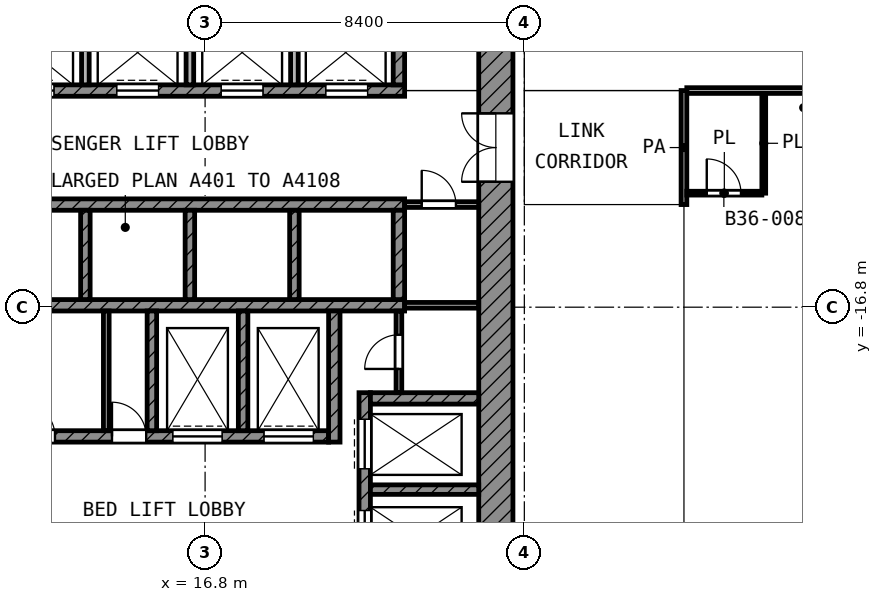
"""IFC4 building model, lengths in metres.
Left out: names, types, materials, properties, quantities, classifications, styles, units other than length and angle.
Written with IfcOpenShell. Run it as: python <this file> out.ifc"""

import sys

from ifc_helpers import new_model, si_unit, direction, frame, frame_2d, origin, place, context, subcontext, project, spatial, rectangle, extrude, element, fill, save


model = new_model("IFC4")
c1 = context("Model", 3, precision=1e-05, world=origin(), true_north=direction((0.0, 1.0)))
c2 = subcontext(c1, "Body", "Model", "MODEL_VIEW")
j1 = project(units=[si_unit("LENGTHUNIT", "METRE"), si_unit("PLANEANGLEUNIT", "RADIAN")], contexts=[c1])
p1 = place(None, origin())
s1 = spatial("IfcSite", under=j1, at=p1, CompositionType="ELEMENT")
p2 = place(p1, origin())
s2 = spatial("IfcBuilding", under=s1, at=p2, CompositionType="ELEMENT")
p3 = place(p2, frame((0.0, 0.0, 158.4)))
s3 = spatial("IfcBuildingStorey", under=s2, at=p3, CompositionType="ELEMENT", Elevation=158.4)
p4 = place(p3, frame((24.45, -24.0, 0.0), z_axis=(0.0, 0.0, 1.0), x_axis=(0.0, 1.0, 0.0)))
e1 = element("IfcWall", 1, at=p4, inside=s3, PredefinedType="SHEAR", context=c2, shape_type="SweptSolid", body=[
    extrude(rectangle(XDim=18.6, YDim=0.9, at=frame_2d((9.3, 0.0))), origin(), (0.0, 0.0, 1.0), 3.6),
])
p5 = place(p4, frame((10.5, 0.0, 0.0)))
e2 = element("IfcOpeningElement", 2, at=p5, cuts=e1, PredefinedType="OPENING", context=c2, shape_type="SweptSolid", body=[
    extrude(rectangle(XDim=1.8, YDim=2.1, at=frame_2d((0.9, 1.05))), frame((0.0, 0.46, 0.0), z_axis=(0.0, -1.0, 0.0), x_axis=(1.0, 0.0, 0.0)), (0.0, 0.0, 1.0), 0.92),
])
p6 = place(p3, frame((5.4, -11.1, 0.0), z_axis=(0.0, 0.0, 1.0), x_axis=(1.0, 0.0, 0.0)))
e3 = element("IfcWall", 3, at=p6, inside=s3, PredefinedType="SHEAR", context=c2, shape_type="SweptSolid", body=[
    extrude(rectangle(XDim=16.65, YDim=0.3, at=frame_2d((8.325, 0.0))), origin(), (0.0, 0.0, 1.0), 3.6),
])
p7 = place(p6, frame((0.825, 0.0, 0.0)))
e4 = element("IfcOpeningElement", 4, at=p7, cuts=e3, PredefinedType="OPENING", context=c2, shape_type="SweptSolid", body=[
    extrude(rectangle(XDim=1.1, YDim=2.1, at=frame_2d((0.55, 1.05))), frame((0.0, 0.16, 0.0), z_axis=(0.0, -1.0, 0.0), x_axis=(1.0, 0.0, 0.0)), (0.0, 0.0, 1.0), 0.32),
])
p8 = place(p6, frame((3.575, 0.0, 0.0)))
e5 = element("IfcOpeningElement", 5, at=p8, cuts=e3, PredefinedType="OPENING", context=c2, shape_type="SweptSolid", body=[
    extrude(rectangle(XDim=1.1, YDim=2.1, at=frame_2d((0.55, 1.05))), frame((0.0, 0.16, 0.0), z_axis=(0.0, -1.0, 0.0), x_axis=(1.0, 0.0, 0.0)), (0.0, 0.0, 1.0), 0.32),
])
p9 = place(p6, frame((6.325, 0.0, 0.0)))
e6 = element("IfcOpeningElement", 6, at=p9, cuts=e3, PredefinedType="OPENING", context=c2, shape_type="SweptSolid", body=[
    extrude(rectangle(XDim=1.1, YDim=2.1, at=frame_2d((0.55, 1.05))), frame((0.0, 0.16, 0.0), z_axis=(0.0, -1.0, 0.0), x_axis=(1.0, 0.0, 0.0)), (0.0, 0.0, 1.0), 0.32),
])
p10 = place(p6, frame((9.075, 0.0, 0.0)))
e7 = element("IfcOpeningElement", 7, at=p10, cuts=e3, PredefinedType="OPENING", context=c2, shape_type="SweptSolid", body=[
    extrude(rectangle(XDim=1.1, YDim=2.1, at=frame_2d((0.55, 1.05))), frame((0.0, 0.16, 0.0), z_axis=(0.0, -1.0, 0.0), x_axis=(1.0, 0.0, 0.0)), (0.0, 0.0, 1.0), 0.32),
])
p11 = place(p6, frame((11.825, 0.0, 0.0)))
e8 = element("IfcOpeningElement", 8, at=p11, cuts=e3, PredefinedType="OPENING", context=c2, shape_type="SweptSolid", body=[
    extrude(rectangle(XDim=1.1, YDim=2.1, at=frame_2d((0.55, 1.05))), frame((0.0, 0.16, 0.0), z_axis=(0.0, -1.0, 0.0), x_axis=(1.0, 0.0, 0.0)), (0.0, 0.0, 1.0), 0.32),
])
p12 = place(p6, frame((14.575, 0.0, 0.0)))
e9 = element("IfcOpeningElement", 9, at=p12, cuts=e3, PredefinedType="OPENING", context=c2, shape_type="SweptSolid", body=[
    extrude(rectangle(XDim=1.1, YDim=2.1, at=frame_2d((0.55, 1.05))), frame((0.0, 0.16, 0.0), z_axis=(0.0, -1.0, 0.0), x_axis=(1.0, 0.0, 0.0)), (0.0, 0.0, 1.0), 0.32),
])
p13 = place(p3, frame((5.4, -14.1, 0.0), z_axis=(0.0, 0.0, 1.0), x_axis=(1.0, 0.0, 0.0)))
e10 = element("IfcWall", 10, at=p13, inside=s3, PredefinedType="SHEAR", context=c2, shape_type="SweptSolid", body=[
    extrude(rectangle(XDim=16.65, YDim=0.3, at=frame_2d((8.325, 0.0))), origin(), (0.0, 0.0, 1.0), 3.6),
])
p14 = place(p13, frame((0.825, 0.0, 0.0)))
e11 = element("IfcOpeningElement", 11, at=p14, cuts=e10, PredefinedType="OPENING", context=c2, shape_type="SweptSolid", body=[
    extrude(rectangle(XDim=1.1, YDim=2.1, at=frame_2d((0.55, 1.05))), frame((0.0, 0.16, 0.0), z_axis=(0.0, -1.0, 0.0), x_axis=(1.0, 0.0, 0.0)), (0.0, 0.0, 1.0), 0.32),
])
p15 = place(p13, frame((3.575, 0.0, 0.0)))
e12 = element("IfcOpeningElement", 12, at=p15, cuts=e10, PredefinedType="OPENING", context=c2, shape_type="SweptSolid", body=[
    extrude(rectangle(XDim=1.1, YDim=2.1, at=frame_2d((0.55, 1.05))), frame((0.0, 0.16, 0.0), z_axis=(0.0, -1.0, 0.0), x_axis=(1.0, 0.0, 0.0)), (0.0, 0.0, 1.0), 0.32),
])
p16 = place(p3, frame((5.4, -16.75, 0.0), z_axis=(0.0, 0.0, 1.0), x_axis=(1.0, 0.0, 0.0)))
e13 = element("IfcWall", 13, at=p16, inside=s3, PredefinedType="SHEAR", context=c2, shape_type="SweptSolid", body=[
    extrude(rectangle(XDim=16.65, YDim=0.3, at=frame_2d((8.325, 0.0))), origin(), (0.0, 0.0, 1.0), 3.6),
])
p17 = place(p3, frame((5.4, -20.2, 0.0), z_axis=(0.0, 0.0, 1.0), x_axis=(1.0, 0.0, 0.0)))
e14 = element("IfcWall", 14, at=p17, inside=s3, PredefinedType="SHEAR", context=c2, shape_type="SweptSolid", body=[
    extrude(rectangle(XDim=14.65, YDim=0.3, at=frame_2d((7.325, 0.0))), origin(), (0.0, 0.0, 1.0), 3.6),
])
p18 = place(p17, frame((10.55, 0.0, 0.0)))
e15 = element("IfcOpeningElement", 15, at=p18, cuts=e14, PredefinedType="OPENING", context=c2, shape_type="SweptSolid", body=[
    extrude(rectangle(XDim=1.3, YDim=2.1, at=frame_2d((0.65, 1.05))), frame((0.0, 0.16, 0.0), z_axis=(0.0, -1.0, 0.0), x_axis=(1.0, 0.0, 0.0)), (0.0, 0.0, 1.0), 0.32),
])
p19 = place(p17, frame((12.95, 0.0, 0.0)))
e16 = element("IfcOpeningElement", 16, at=p19, cuts=e14, PredefinedType="OPENING", context=c2, shape_type="SweptSolid", body=[
    extrude(rectangle(XDim=1.3, YDim=2.1, at=frame_2d((0.65, 1.05))), frame((0.0, 0.16, 0.0), z_axis=(0.0, -1.0, 0.0), x_axis=(1.0, 0.0, 0.0)), (0.0, 0.0, 1.0), 0.32),
])
p20 = place(p17, frame((0.55, 0.0, 0.0)))
e17 = element("IfcOpeningElement", 17, at=p20, cuts=e14, PredefinedType="OPENING", context=c2, shape_type="SweptSolid", body=[
    extrude(rectangle(XDim=1.3, YDim=2.1, at=frame_2d((0.65, 1.05))), frame((0.0, 0.16, 0.0), z_axis=(0.0, -1.0, 0.0), x_axis=(1.0, 0.0, 0.0)), (0.0, 0.0, 1.0), 0.32),
])
p21 = place(p17, frame((2.95, 0.0, 0.0)))
e18 = element("IfcOpeningElement", 18, at=p21, cuts=e14, PredefinedType="OPENING", context=c2, shape_type="SweptSolid", body=[
    extrude(rectangle(XDim=1.3, YDim=2.1, at=frame_2d((0.65, 1.05))), frame((0.0, 0.16, 0.0), z_axis=(0.0, -1.0, 0.0), x_axis=(1.0, 0.0, 0.0)), (0.0, 0.0, 1.0), 0.32),
])
p22 = place(p17, frame((6.55, 0.0, 0.0)))
e19 = element("IfcOpeningElement", 19, at=p22, cuts=e14, PredefinedType="OPENING", context=c2, shape_type="SweptSolid", body=[
    extrude(rectangle(XDim=0.9, YDim=2.1, at=frame_2d((0.45, 1.05))), frame((0.0, 0.16, 0.0), z_axis=(0.0, -1.0, 0.0), x_axis=(1.0, 0.0, 0.0)), (0.0, 0.0, 1.0), 0.32),
])
p23 = place(p17, frame((8.95, 0.0, 0.0)))
e20 = element("IfcOpeningElement", 20, at=p23, cuts=e14, PredefinedType="OPENING", context=c2, shape_type="SweptSolid", body=[
    extrude(rectangle(XDim=0.9, YDim=2.1, at=frame_2d((0.45, 1.05))), frame((0.0, 0.16, 0.0), z_axis=(0.0, -1.0, 0.0), x_axis=(1.0, 0.0, 0.0)), (0.0, 0.0, 1.0), 0.32),
])
p24 = place(p3, frame((20.2, -20.35, 0.0), z_axis=(0.0, 0.0, 1.0), x_axis=(0.0, 1.0, 0.0)))
e21 = element("IfcWall", 21, at=p24, inside=s3, PredefinedType="SHEAR", context=c2, shape_type="SweptSolid", body=[
    extrude(rectangle(XDim=3.45, YDim=0.3, at=frame_2d((1.725, 0.0))), origin(), (0.0, 0.0, 1.0), 3.6),
])
p25 = place(p3, frame((21.9, -10.95, 0.0), z_axis=(0.0, 0.0, 1.0), x_axis=(0.0, 1.0, 0.0)))
e22 = element("IfcWall", 22, at=p25, inside=s3, PredefinedType="SHEAR", context=c2, shape_type="SweptSolid", body=[
    extrude(rectangle(XDim=2.35, YDim=0.3, at=frame_2d((1.175, 0.0))), origin(), (0.0, 0.0, 1.0), 3.6),
])
p26 = place(p3, frame((21.9, -16.6, 0.0), z_axis=(0.0, 0.0, 1.0), x_axis=(0.0, 1.0, 0.0)))
e23 = element("IfcWall", 23, at=p26, inside=s3, PredefinedType="SHEAR", context=c2, shape_type="SweptSolid", body=[
    extrude(rectangle(XDim=2.35, YDim=0.3, at=frame_2d((1.175, 0.0))), origin(), (0.0, 0.0, 1.0), 3.6),
])
p27 = place(p3, frame((21.15, -19.2, 0.0), z_axis=(0.0, 0.0, 1.0), x_axis=(1.0, 0.0, 0.0)))
e24 = element("IfcWall", 24, at=p27, inside=s3, PredefinedType="SHEAR", context=c2, shape_type="SweptSolid", body=[
    extrude(rectangle(XDim=2.85, YDim=0.3, at=frame_2d((1.425, 0.0))), origin(), (0.0, 0.0, 1.0), 3.6),
])
p28 = place(p3, frame((21.0, -24.0, 0.0), z_axis=(0.0, 0.0, 1.0), x_axis=(0.0, 1.0, 0.0)))
e25 = element("IfcWall", 25, at=p28, inside=s3, PredefinedType="SHEAR", context=c2, shape_type="SweptSolid", body=[
    extrude(rectangle(XDim=4.95, YDim=0.3, at=frame_2d((2.475, 0.0))), origin(), (0.0, 0.0, 1.0), 3.6),
])
p29 = place(p28, frame((2.95, 0.0, 0.0)))
e26 = element("IfcOpeningElement", 26, at=p29, cuts=e25, PredefinedType="OPENING", context=c2, shape_type="SweptSolid", body=[
    extrude(rectangle(XDim=1.3, YDim=2.1, at=frame_2d((0.65, 1.05))), frame((0.0, 0.16, 0.0), z_axis=(0.0, -1.0, 0.0), x_axis=(1.0, 0.0, 0.0)), (0.0, 0.0, 1.0), 0.32),
])
p30 = place(p28, frame((0.55, 0.0, 0.0)))
e27 = element("IfcOpeningElement", 27, at=p30, cuts=e25, PredefinedType="OPENING", context=c2, shape_type="SweptSolid", body=[
    extrude(rectangle(XDim=1.3, YDim=2.1, at=frame_2d((0.65, 1.05))), frame((0.0, 0.16, 0.0), z_axis=(0.0, -1.0, 0.0), x_axis=(1.0, 0.0, 0.0)), (0.0, 0.0, 1.0), 0.32),
])
p31 = place(p3, frame((21.15, -21.6, 0.0), z_axis=(0.0, 0.0, 1.0), x_axis=(1.0, 0.0, 0.0)))
e28 = element("IfcWall", 28, at=p31, inside=s3, PredefinedType="SHEAR", context=c2, shape_type="SweptSolid", body=[
    extrude(rectangle(XDim=2.85, YDim=0.25, at=frame_2d((1.425, 0.0))), origin(), (0.0, 0.0, 1.0), 3.6),
])
for number, where, z_axis, x_axis in (
    (29, (15.4, -20.05, 0.0), (0.0, 0.0, 1.0), (0.0, 1.0, 0.0)),
    (30, (17.8, -20.05, 0.0), (0.0, 0.0, 1.0), (0.0, 1.0, 0.0)),
):
    element("IfcWall", number, at=place(p3, frame(where, z_axis=z_axis, x_axis=x_axis)), inside=s3, PredefinedType="SHEAR", context=c2, shape_type="SweptSolid", body=[
        extrude(rectangle(XDim=3.15, YDim=0.25, at=frame_2d((1.575, 0.0))), origin(), (0.0, 0.0, 1.0), 3.6),
    ])
for number, where, z_axis, x_axis in (
    (31, (13.65, -10.95, 0.0), (0.0, 0.0, 1.0), (0.0, 1.0, 0.0)),
    (32, (16.4, -10.95, 0.0), (0.0, 0.0, 1.0), (0.0, 1.0, 0.0)),
    (33, (19.15, -10.95, 0.0), (0.0, 0.0, 1.0), (0.0, 1.0, 0.0)),
):
    element("IfcWall", number, at=place(p3, frame(where, z_axis=z_axis, x_axis=x_axis)), inside=s3, PredefinedType="PARTITIONING", context=c2, shape_type="SweptSolid", body=[
        extrude(rectangle(XDim=2.35, YDim=0.2, at=frame_2d((1.175, 0.0))), origin(), (0.0, 0.0, 1.0), 3.6),
    ])
for number, where, z_axis, x_axis in (
    (34, (13.65, -16.6, 0.0), (0.0, 0.0, 1.0), (0.0, 1.0, 0.0)),
    (35, (16.4, -16.6, 0.0), (0.0, 0.0, 1.0), (0.0, 1.0, 0.0)),
    (36, (19.15, -16.6, 0.0), (0.0, 0.0, 1.0), (0.0, 1.0, 0.0)),
):
    element("IfcWall", number, at=place(p3, frame(where, z_axis=z_axis, x_axis=x_axis)), inside=s3, PredefinedType="SHEAR", context=c2, shape_type="SweptSolid", body=[
        extrude(rectangle(XDim=2.35, YDim=0.25, at=frame_2d((1.175, 0.0))), origin(), (0.0, 0.0, 1.0), 3.6),
    ])
p32 = place(p3, frame((21.9, -19.05, 0.0), z_axis=(0.0, 0.0, 1.0), x_axis=(0.0, 1.0, 0.0)))
e37 = element("IfcWall", 37, at=p32, inside=s3, PredefinedType="PARTITIONING", context=c2, shape_type="SweptSolid", body=[
    extrude(rectangle(XDim=2.15, YDim=0.15, at=frame_2d((1.075, 0.0))), origin(), (0.0, 0.0, 1.0), 3.6),
])
p33 = place(p32, frame((0.625, 0.0, 0.0)))
e38 = element("IfcOpeningElement", 38, at=p33, cuts=e37, PredefinedType="OPENING", context=c2, shape_type="SweptSolid", body=[
    extrude(rectangle(XDim=0.9, YDim=2.1, at=frame_2d((0.45, 1.05))), frame((0.0, 0.085, 0.0), z_axis=(0.0, -1.0, 0.0), x_axis=(1.0, 0.0, 0.0)), (0.0, 0.0, 1.0), 0.17),
])
p34 = place(p3, frame((22.05, -16.75, 0.0), z_axis=(0.0, 0.0, 1.0), x_axis=(1.0, 0.0, 0.0)))
e39 = element("IfcWall", 39, at=p34, inside=s3, PredefinedType="PARTITIONING", context=c2, shape_type="SweptSolid", body=[
    extrude(rectangle(XDim=1.95, YDim=0.15, at=frame_2d((0.975, 0.0))), origin(), (0.0, 0.0, 1.0), 3.6),
])
p35 = place(p3, frame((22.05, -14.1, 0.0), z_axis=(0.0, 0.0, 1.0), x_axis=(1.0, 0.0, 0.0)))
e40 = element("IfcWall", 40, at=p35, inside=s3, PredefinedType="PARTITIONING", context=c2, shape_type="SweptSolid", body=[
    extrude(rectangle(XDim=1.95, YDim=0.15, at=frame_2d((0.975, 0.0))), origin(), (0.0, 0.0, 1.0), 3.6),
])
p36 = place(p35, frame((0.45, 0.0, 0.0)))
e41 = element("IfcOpeningElement", 41, at=p36, cuts=e40, PredefinedType="OPENING", context=c2, shape_type="SweptSolid", body=[
    extrude(rectangle(XDim=0.9, YDim=2.1, at=frame_2d((0.45, 1.05))), frame((0.0, 0.085, 0.0), z_axis=(0.0, -1.0, 0.0), x_axis=(1.0, 0.0, 0.0)), (0.0, 0.0, 1.0), 0.17),
])
p37 = place(p3, frame((14.2, -20.05, 0.0), z_axis=(0.0, 0.0, 1.0), x_axis=(0.0, 1.0, 0.0)))
e42 = element("IfcWall", 42, at=p37, inside=s3, PredefinedType="PARTITIONING", context=c2, shape_type="SweptSolid", body=[
    extrude(rectangle(XDim=3.15, YDim=0.15, at=frame_2d((1.575, 0.0))), origin(), (0.0, 0.0, 1.0), 3.6),
])
p38 = place(p3, frame((29.475, -13.8, 0.0), z_axis=(0.0, 0.0, 1.0), x_axis=(1.0, 0.0, 0.0)))
e43 = element("IfcWall", 43, at=p38, inside=s3, PredefinedType="PARTITIONING", context=c2, shape_type="SweptSolid", body=[
    extrude(rectangle(XDim=1.975, YDim=0.1, at=frame_2d((0.987, 0.0))), origin(), (0.0, 0.0, 1.0), 3.6),
])
p39 = place(p38, frame((0.525, 0.0, 0.0)))
e44 = element("IfcOpeningElement", 44, at=p39, cuts=e43, PredefinedType="OPENING", context=c2, shape_type="SweptSolid", body=[
    extrude(rectangle(XDim=0.9, YDim=2.1, at=frame_2d((0.45, 1.05))), frame((0.0, 0.06, 0.0), z_axis=(0.0, -1.0, 0.0), x_axis=(1.0, 0.0, 0.0)), (0.0, 0.0, 1.0), 0.12),
])
p40 = place(p3, frame((31.5, -13.8, 0.0), z_axis=(0.0, 0.0, 1.0), x_axis=(0.0, 1.0, 0.0)))
e45 = element("IfcWall", 45, at=p40, inside=s3, PredefinedType="PARTITIONING", context=c2, shape_type="SweptSolid", body=[
    extrude(rectangle(XDim=2.625, YDim=0.1, at=frame_2d((1.312, 0.0))), origin(), (0.0, 0.0, 1.0), 3.6),
])
p41 = place(p3, frame((29.475, -11.1, 0.0), z_axis=(0.0, 0.0, 1.0), x_axis=(1.0, 0.0, 0.0)))
e46 = element("IfcWall", 46, at=p41, inside=s3, PredefinedType="PARTITIONING", context=c2, shape_type="SweptSolid", body=[
    extrude(rectangle(XDim=37.645, YDim=0.15, at=frame_2d((18.823, 0.0))), origin(), (0.0, 0.0, 1.0), 3.6),
])
p42 = place(p41, frame((17.225, 0.0, 0.0)))
e47 = element("IfcOpeningElement", 47, at=p42, cuts=e46, PredefinedType="OPENING", context=c2, shape_type="SweptSolid", body=[
    extrude(rectangle(XDim=1.2, YDim=2.1, at=frame_2d((0.6, 1.05))), frame((0.0, 0.085, 0.0), z_axis=(0.0, -1.0, 0.0), x_axis=(1.0, 0.0, 0.0)), (0.0, 0.0, 1.0), 0.17),
])
p43 = place(p41, frame((9.325, 0.0, 0.0)))
e48 = element("IfcOpeningElement", 48, at=p43, cuts=e46, PredefinedType="OPENING", context=c2, shape_type="SweptSolid", body=[
    extrude(rectangle(XDim=1.2, YDim=2.1, at=frame_2d((0.6, 1.05))), frame((0.0, 0.085, 0.0), z_axis=(0.0, -1.0, 0.0), x_axis=(1.0, 0.0, 0.0)), (0.0, 0.0, 1.0), 0.17),
])
p44 = place(p41, frame((27.025, 0.0, 0.0)))
e49 = element("IfcOpeningElement", 49, at=p44, cuts=e46, PredefinedType="OPENING", context=c2, shape_type="SweptSolid", body=[
    extrude(rectangle(XDim=1.0, YDim=2.1, at=frame_2d((0.5, 1.05))), frame((0.0, 0.085, 0.0), z_axis=(0.0, -1.0, 0.0), x_axis=(1.0, 0.0, 0.0)), (0.0, 0.0, 1.0), 0.17),
])
p45 = place(p41, frame((32.775, 0.0, 0.0)))
e50 = element("IfcOpeningElement", 50, at=p45, cuts=e46, PredefinedType="OPENING", context=c2, shape_type="SweptSolid", body=[
    extrude(rectangle(XDim=1.5, YDim=2.1, at=frame_2d((0.75, 1.05))), frame((0.0, 0.085, 0.0), z_axis=(0.0, -1.0, 0.0), x_axis=(1.0, 0.0, 0.0)), (0.0, 0.0, 1.0), 0.17),
])
p46 = place(p3, frame((29.4, -14.1, 0.0), z_axis=(0.0, 0.0, 1.0), x_axis=(0.0, 1.0, 0.0)))
e51 = element("IfcWall", 51, at=p46, inside=s3, PredefinedType="PARTITIONING", context=c2, shape_type="SweptSolid", body=[
    extrude(rectangle(XDim=3.0, YDim=0.15, at=frame_2d((1.5, 0.0))), origin(), (0.0, 0.0, 1.0), 3.6),
])
p47 = place(p9, origin())
e52 = element("IfcDoor", 52, at=p47, inside=s3, OperationType="DOUBLE_DOOR_SLIDING", PredefinedType="DOOR", context=c2, shape_type="SweptSolid", body=[
    extrude(rectangle(XDim=1.1, YDim=2.1, at=frame_2d((0.55, 1.05))), frame((0.0, 0.025, 0.0), z_axis=(0.0, -1.0, 0.0), x_axis=(1.0, 0.0, 0.0)), (0.0, 0.0, 1.0), 0.05),
])
fill(e6, e52)
p48 = place(p10, origin())
e53 = element("IfcDoor", 53, at=p48, inside=s3, OperationType="DOUBLE_DOOR_SLIDING", PredefinedType="DOOR", context=c2, shape_type="SweptSolid", body=[
    extrude(rectangle(XDim=1.1, YDim=2.1, at=frame_2d((0.55, 1.05))), frame((0.0, 0.025, 0.0), z_axis=(0.0, -1.0, 0.0), x_axis=(1.0, 0.0, 0.0)), (0.0, 0.0, 1.0), 0.05),
])
fill(e7, e53)
p49 = place(p11, origin())
e54 = element("IfcDoor", 54, at=p49, inside=s3, OperationType="DOUBLE_DOOR_SLIDING", PredefinedType="DOOR", context=c2, shape_type="SweptSolid", body=[
    extrude(rectangle(XDim=1.1, YDim=2.1, at=frame_2d((0.55, 1.05))), frame((0.0, 0.025, 0.0), z_axis=(0.0, -1.0, 0.0), x_axis=(1.0, 0.0, 0.0)), (0.0, 0.0, 1.0), 0.05),
])
fill(e8, e54)
p50 = place(p12, origin())
e55 = element("IfcDoor", 55, at=p50, inside=s3, OperationType="DOUBLE_DOOR_SLIDING", PredefinedType="DOOR", context=c2, shape_type="SweptSolid", body=[
    extrude(rectangle(XDim=1.1, YDim=2.1, at=frame_2d((0.55, 1.05))), frame((0.0, 0.025, 0.0), z_axis=(0.0, -1.0, 0.0), x_axis=(1.0, 0.0, 0.0)), (0.0, 0.0, 1.0), 0.05),
])
fill(e9, e55)
p51 = place(p29, origin())
e56 = element("IfcDoor", 56, at=p51, inside=s3, OperationType="DOUBLE_DOOR_SLIDING", PredefinedType="DOOR", context=c2, shape_type="SweptSolid", body=[
    extrude(rectangle(XDim=1.3, YDim=2.1, at=frame_2d((0.65, 1.05))), frame((0.0, 0.025, 0.0), z_axis=(0.0, -1.0, 0.0), x_axis=(1.0, 0.0, 0.0)), (0.0, 0.0, 1.0), 0.05),
])
fill(e26, e56)
p52 = place(p30, origin())
e57 = element("IfcDoor", 57, at=p52, inside=s3, OperationType="DOUBLE_DOOR_SLIDING", PredefinedType="DOOR", context=c2, shape_type="SweptSolid", body=[
    extrude(rectangle(XDim=1.3, YDim=2.1, at=frame_2d((0.65, 1.05))), frame((0.0, 0.025, 0.0), z_axis=(0.0, -1.0, 0.0), x_axis=(1.0, 0.0, 0.0)), (0.0, 0.0, 1.0), 0.05),
])
fill(e27, e57)
p53 = place(p18, origin())
e58 = element("IfcDoor", 58, at=p53, inside=s3, OperationType="DOUBLE_DOOR_SLIDING", PredefinedType="DOOR", context=c2, shape_type="SweptSolid", body=[
    extrude(rectangle(XDim=1.3, YDim=2.1, at=frame_2d((0.65, 1.05))), frame((0.0, 0.025, 0.0), z_axis=(0.0, -1.0, 0.0), x_axis=(1.0, 0.0, 0.0)), (0.0, 0.0, 1.0), 0.05),
])
fill(e15, e58)
p54 = place(p19, origin())
e59 = element("IfcDoor", 59, at=p54, inside=s3, OperationType="DOUBLE_DOOR_SLIDING", PredefinedType="DOOR", context=c2, shape_type="SweptSolid", body=[
    extrude(rectangle(XDim=1.3, YDim=2.1, at=frame_2d((0.65, 1.05))), frame((0.0, 0.025, 0.0), z_axis=(0.0, -1.0, 0.0), x_axis=(1.0, 0.0, 0.0)), (0.0, 0.0, 1.0), 0.05),
])
fill(e16, e59)
p55 = place(p5, origin())
e60 = element("IfcDoor", 60, at=p55, inside=s3, OperationType="DOUBLE_DOOR_SINGLE_SWING", PredefinedType="DOOR", context=c2, shape_type="SweptSolid", body=[
    extrude(rectangle(XDim=1.8, YDim=2.1, at=frame_2d((0.9, 1.05))), frame((0.0, 0.025, 0.0), z_axis=(0.0, -1.0, 0.0), x_axis=(1.0, 0.0, 0.0)), (0.0, 0.0, 1.0), 0.05),
])
fill(e2, e60)
p56 = place(p36, origin())
e61 = element("IfcDoor", 61, at=p56, inside=s3, OperationType="SINGLE_SWING_LEFT", PredefinedType="DOOR", context=c2, shape_type="SweptSolid", body=[
    extrude(rectangle(XDim=0.9, YDim=2.1, at=frame_2d((0.45, 1.05))), frame((0.0, 0.025, 0.0), z_axis=(0.0, -1.0, 0.0), x_axis=(1.0, 0.0, 0.0)), (0.0, 0.0, 1.0), 0.05),
])
fill(e41, e61)
p57 = place(p33, origin())
e62 = element("IfcDoor", 62, at=p57, inside=s3, OperationType="SINGLE_SWING_LEFT", PredefinedType="DOOR", context=c2, shape_type="SweptSolid", body=[
    extrude(rectangle(XDim=0.9, YDim=2.1, at=frame_2d((0.45, 1.05))), frame((0.0, 0.025, 0.0), z_axis=(0.0, -1.0, 0.0), x_axis=(1.0, 0.0, 0.0)), (0.0, 0.0, 1.0), 0.05),
])
fill(e38, e62)
p58 = place(p22, origin())
e63 = element("IfcDoor", 63, at=p58, inside=s3, OperationType="SINGLE_SWING_LEFT", PredefinedType="DOOR", context=c2, shape_type="SweptSolid", body=[
    extrude(rectangle(XDim=0.9, YDim=2.1, at=frame_2d((0.45, 1.05))), frame((0.0, 0.025, 0.0), z_axis=(0.0, -1.0, 0.0), x_axis=(1.0, 0.0, 0.0)), (0.0, 0.0, 1.0), 0.05),
])
fill(e19, e63)
p59 = place(p23, origin())
e64 = element("IfcDoor", 64, at=p59, inside=s3, OperationType="SINGLE_SWING_LEFT", PredefinedType="DOOR", context=c2, shape_type="SweptSolid", body=[
    extrude(rectangle(XDim=0.9, YDim=2.1, at=frame_2d((0.45, 1.05))), frame((0.0, 0.025, 0.0), z_axis=(0.0, -1.0, 0.0), x_axis=(1.0, 0.0, 0.0)), (0.0, 0.0, 1.0), 0.05),
])
fill(e20, e64)
p60 = place(p39, origin())
e65 = element("IfcDoor", 65, at=p60, inside=s3, OperationType="SINGLE_SWING_LEFT", PredefinedType="DOOR", context=c2, shape_type="SweptSolid", body=[
    extrude(rectangle(XDim=0.9, YDim=2.1, at=frame_2d((0.45, 1.05))), frame((0.0, 0.025, 0.0), z_axis=(0.0, -1.0, 0.0), x_axis=(1.0, 0.0, 0.0)), (0.0, 0.0, 1.0), 0.05),
])
fill(e44, e65)
save(model, sys.argv[1])
